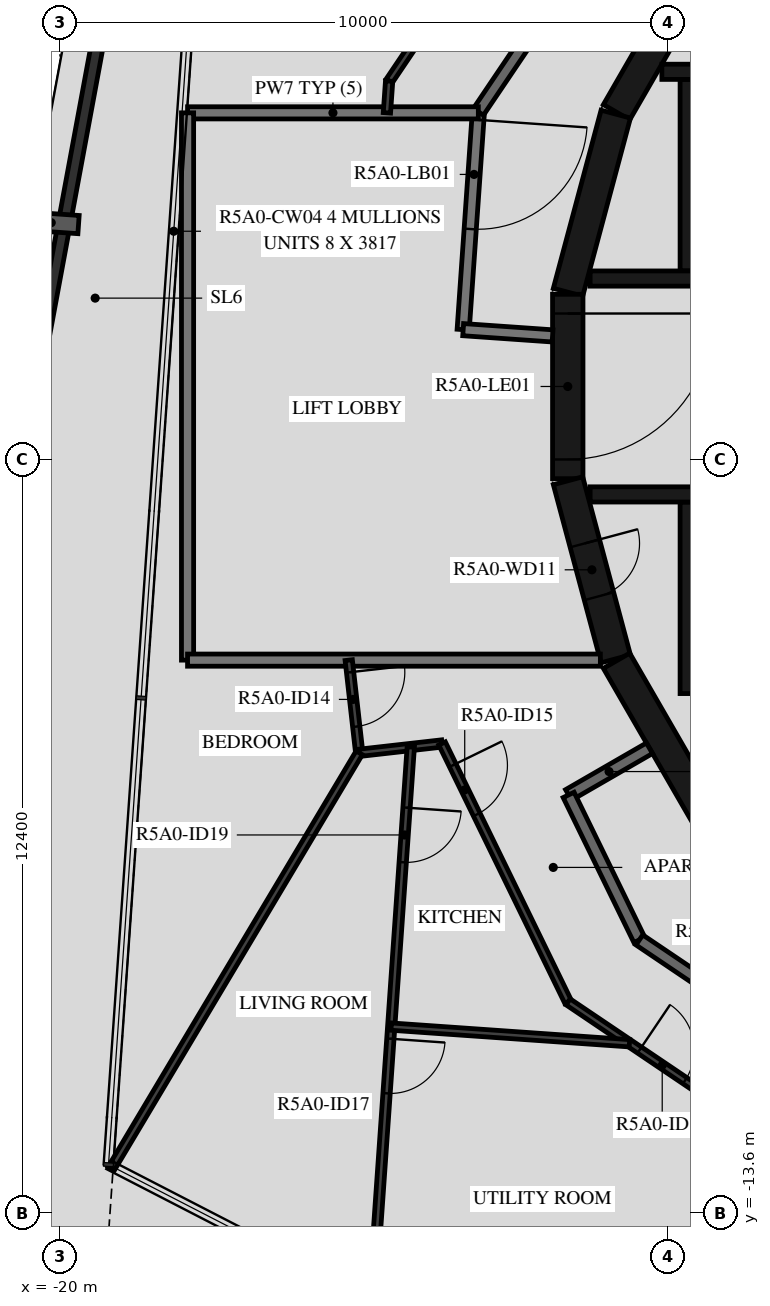
"""IFC4 building model, lengths in metres.
Left out: names, types, materials, properties, quantities, classifications, styles, units other than length and angle.
Written with IfcOpenShell. Run it as: python <this file> out.ifc"""

import sys

from ifc_helpers import new_model, si_unit, direction, frame, frame_2d, origin, origin_2d, place, context, subcontext, project, spatial, polyline, rectangle, i_section, outline, extrude, element, fill, save


model = new_model("IFC4")
c1 = context("Model", 3, precision=1e-05, world=origin(), true_north=direction((0.0, 1.0)))
c2 = subcontext(c1, "Body", "Model", "MODEL_VIEW")
j1 = project(units=[si_unit("LENGTHUNIT", "METRE"), si_unit("PLANEANGLEUNIT", "RADIAN")], contexts=[c1])
p1 = place(None, origin())
s1 = spatial("IfcSite", under=j1, at=p1, CompositionType="ELEMENT")
p2 = place(p1, origin())
s2 = spatial("IfcBuilding", under=s1, at=p2, CompositionType="ELEMENT")
p3 = place(p2, frame((0.0, 0.0, 188.4)))
s3 = spatial("IfcBuildingStorey", under=s2, at=p3, CompositionType="ELEMENT", Elevation=188.4)
p4 = place(p3, frame((-20.142, 2.694, -0.45), z_axis=(0.0, 0.0, 1.0), x_axis=(0.069756005795, 0.997564082982, 0.0)))
e1 = element("IfcColumn", 1, at=p4, inside=s3, PredefinedType="COLUMN", context=c2, shape_type="SweptSolid", body=[
    extrude(i_section(OverallWidth=0.3, OverallDepth=0.9, WebThickness=0.019, FlangeThickness=0.035, FilletRadius=0.03, at=origin_2d()), origin(), (0.0, 0.0, 1.0), 3.57),
])
p5 = place(p3, frame((-23.066, -14.25, 0.03), z_axis=(0.0, 0.0, 1.0), x_axis=(0.182236609877, 0.983254706585, 0.0)))
e2 = element("IfcWall", 2, at=p5, inside=s3, PredefinedType="PARAPET", context=c2, shape_type="SweptSolid", body=[
    extrude(rectangle(XDim=36.429, YDim=0.2, at=frame_2d((18.214, 0.0))), origin(), (0.0, 0.0, 1.0), 1.5),
])
for number, where, z_axis, x_axis in (
    (3, (-9.329, 7.137, 0.0), (0.0, 0.0, 1.0), (-0.5, -0.866, 0.0)),
    (4, (-10.858, 4.479, 0.0), (0.0, 0.0, 1.0), (-0.259, -0.966, 0.0)),
):
    element("IfcWall", number, at=place(p3, frame(where, z_axis=z_axis, x_axis=x_axis)), inside=s3, PredefinedType="SHEAR", context=c2, shape_type="SweptSolid", body=[
        extrude(rectangle(XDim=3.033, YDim=0.5, at=frame_2d((1.516, 0.0))), origin(), (0.0, 0.0, 1.0), 3.12),
    ])
p6 = place(p3, frame((-11.647, 1.516, 0.0), z_axis=(0.0, 0.0, 1.0), x_axis=(0.0, -1.0, 0.0)))
e5 = element("IfcWall", 5, at=p6, inside=s3, PredefinedType="SHEAR", context=c2, shape_type="SweptSolid", body=[
    extrude(rectangle(XDim=3.033, YDim=0.5, at=frame_2d((1.516, 0.0))), origin(), (0.0, 0.0, 1.0), 3.12),
])
p7 = place(p6, frame((0.316, 0.0, 0.0)))
e6 = element("IfcOpeningElement", 6, at=p7, cuts=e5, PredefinedType="OPENING", context=c2, shape_type="SweptSolid", body=[
    extrude(rectangle(XDim=2.4, YDim=2.1, at=frame_2d((1.2, 1.05))), frame((0.0, 0.26, 0.0), z_axis=(0.0, -1.0, 0.0), x_axis=(1.0, 0.0, 0.0)), (0.0, 0.0, 1.0), 0.52),
])
p8 = place(p3, frame((-11.643, -1.55, 0.0), z_axis=(0.0, 0.0, 1.0), x_axis=(0.258734743916, -0.965948410781, 0.0)))
e7 = element("IfcWall", 7, at=p8, inside=s3, PredefinedType="SHEAR", context=c2, shape_type="SweptSolid", body=[
    extrude(rectangle(XDim=3.033, YDim=0.5, at=frame_2d((1.516, 0.0))), origin(), (0.0, 0.0, 1.0), 3.12),
])
p9 = place(p8, frame((1.066, 0.0, 0.0)))
e8 = element("IfcOpeningElement", 8, at=p9, cuts=e7, PredefinedType="OPENING", context=c2, shape_type="SweptSolid", body=[
    extrude(rectangle(XDim=0.9, YDim=2.1, at=frame_2d((0.45, 1.05))), frame((0.0, 0.26, 0.0), z_axis=(0.0, -1.0, 0.0), x_axis=(1.0, 0.0, 0.0)), (0.0, 0.0, 1.0), 0.52),
])
p10 = place(p3, frame((-10.845, -4.51, 0.0), z_axis=(0.0, 0.0, 1.0), x_axis=(0.500087131594, -0.865975092491, 0.0)))
e9 = element("IfcWall", 9, at=p10, inside=s3, PredefinedType="SHEAR", context=c2, shape_type="SweptSolid", body=[
    extrude(rectangle(XDim=3.033, YDim=0.5, at=frame_2d((1.516, 0.0))), origin(), (0.0, 0.0, 1.0), 3.12),
])
p11 = place(p3, frame((-7.0, 5.175, 0.0), z_axis=(0.0, 0.0, 1.0), x_axis=(-1.0, 0.0, 0.0)))
e10 = element("IfcWall", 10, at=p11, inside=s3, PredefinedType="SHEAR", context=c2, shape_type="SweptSolid", body=[
    extrude(rectangle(XDim=3.1, YDim=0.25, at=frame_2d((1.55, 0.0))), origin(), (0.0, 0.0, 1.0), 3.12),
])
p12 = place(p3, origin())
e11 = element("IfcWall", 11, at=p12, inside=s3, PredefinedType="SHEAR", context=c2, shape_type="SweptSolid", body=[
    extrude(outline(polyline([(-9.55, 4.8), (-5.5, 4.8), (-5.5, 1.9), (-5.25, 1.9), (-5.25, 4.8), (-1.2, 4.8), (-1.2, 1.9), (-0.95, 1.9), (-0.95, 4.8), (0.95, 4.8), (0.95, 1.9), (1.2, 1.9), (1.2, 4.8), (3.1, 4.8), (3.1, 1.9), (3.35, 1.9), (3.35, 4.8), (5.25, 4.8), (5.25, 1.9), (5.5, 1.9), (5.5, 4.8), (7.4, 4.8), (7.4, 1.9), (7.65, 1.9), (7.65, 4.8), (9.55, 4.8), (9.55, 1.9), (9.8, 1.9), (9.8, 4.8), (9.8, 5.05), (-9.8, 5.05), (-9.8, 4.8), (-9.8, 1.9), (-9.55, 1.9), (-9.55, 4.8)])), origin(), (0.0, 0.0, 1.0), 3.12),
])
p13 = place(p3, origin())
e12 = element("IfcWall", 12, at=p13, inside=s3, PredefinedType="SHEAR", context=c2, shape_type="SweptSolid", body=[
    extrude(outline(polyline([(9.8, -5.05), (9.8, -4.8), (9.8, -1.9), (9.55, -1.9), (9.55, -4.8), (7.65, -4.8), (7.65, -1.9), (7.4, -1.9), (7.4, -4.8), (5.5, -4.8), (5.5, -1.9), (5.25, -1.9), (5.25, -4.8), (3.35, -4.8), (3.35, -1.9), (3.1, -1.9), (3.1, -4.8), (1.2, -4.8), (1.2, -1.9), (0.95, -1.9), (0.95, -4.8), (-0.95, -4.8), (-0.95, -1.9), (-1.2, -1.9), (-1.2, -4.8), (-3.1, -4.8), (-3.1, -1.9), (-3.35, -1.9), (-3.35, -4.8), (-5.25, -4.8), (-5.25, -1.9), (-5.5, -1.9), (-5.5, -4.8), (-7.4, -4.8), (-7.4, -1.9), (-7.65, -1.9), (-7.65, -4.8), (-9.55, -4.8), (-9.55, -1.9), (-9.8, -1.9), (-9.8, -4.8), (-9.8, -5.05), (9.8, -5.05)])), origin(), (0.0, 0.0, 1.0), 3.12),
])
p14 = place(p3, frame((-11.28, 1.775, 0.0), z_axis=(0.0, 0.0, 1.0), x_axis=(1.0, 0.0, 0.0)))
e13 = element("IfcWall", 13, at=p14, inside=s3, PredefinedType="SHEAR", context=c2, shape_type="SweptSolid", body=[
    extrude(rectangle(XDim=14.38, YDim=0.25, at=frame_2d((7.19, 0.0))), origin(), (0.0, 0.0, 1.0), 3.12),
])
p15 = place(p14, frame((10.73, 0.0, 0.0)))
e14 = element("IfcOpeningElement", 14, at=p15, cuts=e13, PredefinedType="OPENING", context=c2, shape_type="SweptSolid", body=[
    extrude(rectangle(XDim=1.1, YDim=2.1, at=frame_2d((0.55, 1.05))), frame((0.0, 0.135, 0.0), z_axis=(0.0, -1.0, 0.0), x_axis=(1.0, 0.0, 0.0)), (0.0, 0.0, 1.0), 0.27),
])
p16 = place(p14, frame((12.88, 0.0, 0.0)))
e15 = element("IfcOpeningElement", 15, at=p16, cuts=e13, PredefinedType="OPENING", context=c2, shape_type="SweptSolid", body=[
    extrude(rectangle(XDim=1.1, YDim=2.1, at=frame_2d((0.55, 1.05))), frame((0.0, 0.135, 0.0), z_axis=(0.0, -1.0, 0.0), x_axis=(1.0, 0.0, 0.0)), (0.0, 0.0, 1.0), 0.27),
])
p17 = place(p14, frame((3.305, 0.0, 0.0)))
e16 = element("IfcOpeningElement", 16, at=p17, cuts=e13, PredefinedType="OPENING", context=c2, shape_type="SweptSolid", body=[
    extrude(rectangle(XDim=0.9, YDim=2.1, at=frame_2d((0.45, 1.05))), frame((0.0, 0.135, 0.0), z_axis=(0.0, -1.0, 0.0), x_axis=(1.0, 0.0, 0.0)), (0.0, 0.0, 1.0), 0.27),
])
p18 = place(p14, frame((7.605, 0.0, 0.0)))
e17 = element("IfcOpeningElement", 17, at=p18, cuts=e13, PredefinedType="OPENING", context=c2, shape_type="SweptSolid", body=[
    extrude(rectangle(XDim=0.9, YDim=2.1, at=frame_2d((0.45, 1.05))), frame((0.0, 0.135, 0.0), z_axis=(0.0, -1.0, 0.0), x_axis=(1.0, 0.0, 0.0)), (0.0, 0.0, 1.0), 0.27),
])
p19 = place(p3, frame((-11.28, -1.775, 0.0), z_axis=(0.0, 0.0, 1.0), x_axis=(1.0, 0.0, 0.0)))
e18 = element("IfcWall", 18, at=p19, inside=s3, PredefinedType="SHEAR", context=c2, shape_type="SweptSolid", body=[
    extrude(rectangle(XDim=14.38, YDim=0.25, at=frame_2d((7.19, 0.0))), origin(), (0.0, 0.0, 1.0), 3.12),
])
p20 = place(p19, frame((12.88, 0.0, 0.0)))
e19 = element("IfcOpeningElement", 19, at=p20, cuts=e18, PredefinedType="OPENING", context=c2, shape_type="SweptSolid", body=[
    extrude(rectangle(XDim=1.1, YDim=2.1, at=frame_2d((0.55, 1.05))), frame((0.0, 0.135, 0.0), z_axis=(0.0, -1.0, 0.0), x_axis=(1.0, 0.0, 0.0)), (0.0, 0.0, 1.0), 0.27),
])
p21 = place(p19, frame((6.53, 0.0, 0.0)))
e20 = element("IfcOpeningElement", 20, at=p21, cuts=e18, PredefinedType="OPENING", context=c2, shape_type="SweptSolid", body=[
    extrude(rectangle(XDim=0.9, YDim=2.1, at=frame_2d((0.45, 1.05))), frame((0.0, 0.135, 0.0), z_axis=(0.0, -1.0, 0.0), x_axis=(1.0, 0.0, 0.0)), (0.0, 0.0, 1.0), 0.27),
])
p22 = place(p19, frame((8.68, 0.0, 0.0)))
e21 = element("IfcOpeningElement", 21, at=p22, cuts=e18, PredefinedType="OPENING", context=c2, shape_type="SweptSolid", body=[
    extrude(rectangle(XDim=0.9, YDim=2.1, at=frame_2d((0.45, 1.05))), frame((0.0, 0.135, 0.0), z_axis=(0.0, -1.0, 0.0), x_axis=(1.0, 0.0, 0.0)), (0.0, 0.0, 1.0), 0.27),
])
p23 = place(p19, frame((10.83, 0.0, 0.0)))
e22 = element("IfcOpeningElement", 22, at=p23, cuts=e18, PredefinedType="OPENING", context=c2, shape_type="SweptSolid", body=[
    extrude(rectangle(XDim=0.9, YDim=2.1, at=frame_2d((0.45, 1.05))), frame((0.0, 0.135, 0.0), z_axis=(0.0, -1.0, 0.0), x_axis=(1.0, 0.0, 0.0)), (0.0, 0.0, 1.0), 0.27),
])
p24 = place(p3, frame((-13.118, 4.5, 0.0), z_axis=(0.0, 0.0, 1.0), x_axis=(-0.069746872611, -0.99756472159, 0.0)))
e23 = element("IfcWall", 23, at=p24, inside=s3, PredefinedType="STANDARD", context=c2, shape_type="SweptSolid", body=[
    extrude(rectangle(XDim=3.574, YDim=0.2, at=frame_2d((1.787, 0.0))), origin(), (0.0, 0.0, 1.0), 3.12),
])
p25 = place(p24, frame((0.115, 0.0, 0.0)))
e24 = element("IfcOpeningElement", 24, at=p25, cuts=e23, PredefinedType="OPENING", context=c2, shape_type="SweptSolid", body=[
    extrude(rectangle(XDim=1.8, YDim=2.1, at=frame_2d((0.9, 1.05))), frame((0.0, 0.11, 0.0), z_axis=(0.0, -1.0, 0.0), x_axis=(1.0, 0.0, 0.0)), (0.0, 0.0, 1.0), 0.22),
])
p26 = place(p3, frame((-13.367, 0.935, 0.0), z_axis=(0.0, 0.0, 1.0), x_axis=(0.997553656289, -0.069904955655, 0.0)))
e25 = element("IfcWall", 25, at=p26, inside=s3, PredefinedType="STANDARD", context=c2, shape_type="SweptSolid", body=[
    extrude(rectangle(XDim=1.474, YDim=0.2, at=frame_2d((0.737, 0.0))), origin(), (0.0, 0.0, 1.0), 3.12),
])
p27 = place(p3, frame((-9.101, 10.47, 0.0), z_axis=(0.0, 0.0, 1.0), x_axis=(-0.559195469534, -0.829035841718, 0.0)))
e26 = element("IfcWall", 26, at=p27, inside=s3, PredefinedType="STANDARD", context=c2, shape_type="SweptSolid", body=[
    extrude(rectangle(XDim=7.181, YDim=0.2, at=frame_2d((3.591, 0.0))), origin(), (0.0, 0.0, 1.0), 3.12),
])
p28 = place(p27, frame((1.0, 0.0, 0.0)))
e27 = element("IfcOpeningElement", 27, at=p28, cuts=e26, PredefinedType="OPENING", context=c2, shape_type="SweptSolid", body=[
    extrude(rectangle(XDim=1.0, YDim=2.1, at=frame_2d((0.5, 1.05))), frame((0.0, 0.11, 0.0), z_axis=(0.0, -1.0, 0.0), x_axis=(1.0, 0.0, 0.0)), (0.0, 0.0, 1.0), 0.22),
])
p29 = place(p3, frame((-10.303, -5.949, 0.0), z_axis=(0.0, 0.0, 1.0), x_axis=(-0.866042588199, -0.499970234539, 0.0)))
e28 = element("IfcWall", 28, at=p29, inside=s3, PredefinedType="STANDARD", context=c2, shape_type="SweptSolid", body=[
    extrude(rectangle(XDim=1.535, YDim=0.2, at=frame_2d((0.768, 0.0))), origin(), (0.0, 0.0, 1.0), 3.12),
])
p30 = place(p3, frame((-11.633, -6.716, 0.0), z_axis=(0.0, 0.0, 1.0), x_axis=(0.438322116278, -0.898817958422, 0.0)))
e29 = element("IfcWall", 29, at=p30, inside=s3, PredefinedType="STANDARD", context=c2, shape_type="SweptSolid", body=[
    extrude(rectangle(XDim=2.654, YDim=0.2, at=frame_2d((1.327, 0.0))), origin(), (0.0, 0.0, 1.0), 3.12),
])
p31 = place(p3, frame((-10.47, -9.101, 0.0), z_axis=(0.0, 0.0, 1.0), x_axis=(0.829035841718, -0.559195469534, 0.0)))
e30 = element("IfcWall", 30, at=p31, inside=s3, PredefinedType="STANDARD", context=c2, shape_type="SweptSolid", body=[
    extrude(rectangle(XDim=7.181, YDim=0.2, at=frame_2d((3.591, 0.0))), origin(), (0.0, 0.0, 1.0), 3.12),
])
p32 = place(p31, frame((2.39, 0.0, 0.0)))
e31 = element("IfcOpeningElement", 31, at=p32, cuts=e30, PredefinedType="OPENING", context=c2, shape_type="SweptSolid", body=[
    extrude(rectangle(XDim=1.0, YDim=2.1, at=frame_2d((0.5, 1.05))), frame((0.0, 0.11, 0.0), z_axis=(0.0, -1.0, 0.0), x_axis=(1.0, 0.0, 0.0)), (0.0, 0.0, 1.0), 0.22),
])
p33 = place(p3, frame((-13.118, 4.5, 0.0), z_axis=(0.0, 0.0, 1.0), x_axis=(-1.0, 0.0, 0.0)))
e32 = element("IfcWall", 32, at=p33, inside=s3, PredefinedType="STANDARD", context=c2, shape_type="SweptSolid", body=[
    extrude(rectangle(XDim=4.782, YDim=0.2, at=frame_2d((2.391, 0.0))), origin(), (0.0, 0.0, 1.0), 3.12),
])
p34 = place(p3, frame((-17.9, 4.5, 0.0), z_axis=(0.0, 0.0, 1.0), x_axis=(0.0, -1.0, 0.0)))
e33 = element("IfcWall", 33, at=p34, inside=s3, PredefinedType="STANDARD", context=c2, shape_type="SweptSolid", body=[
    extrude(rectangle(XDim=9.0, YDim=0.2, at=frame_2d((4.5, 0.0))), origin(), (0.0, 0.0, 1.0), 3.12),
])
p35 = place(p3, frame((-17.9, -4.5, 0.0), z_axis=(0.0, 0.0, 1.0), x_axis=(1.0, 0.0, 0.0)))
e34 = element("IfcWall", 34, at=p35, inside=s3, PredefinedType="STANDARD", context=c2, shape_type="SweptSolid", body=[
    extrude(rectangle(XDim=6.789, YDim=0.2, at=frame_2d((3.394, 0.0))), origin(), (0.0, 0.0, 1.0), 3.12),
])
p36 = place(p3, frame((-10.407, -15.43, 0.0), z_axis=(0.0, 0.0, 1.0), x_axis=(0.559038328133, 0.829141813973, 0.0)))
e35 = element("IfcWall", 35, at=p36, inside=s3, PredefinedType="STANDARD", context=c2, shape_type="SweptSolid", body=[
    extrude(rectangle(XDim=5.212, YDim=0.2, at=frame_2d((2.606, 0.0))), origin(), (0.0, 0.0, 1.0), 3.12),
])
p37 = place(p3, frame((-10.12, 11.642, 0.0), z_axis=(0.0, 0.0, 1.0), x_axis=(-0.55920080659, -0.829032241779, 0.0)))
e36 = element("IfcWall", 36, at=p37, inside=s3, PredefinedType="PARTITIONING", context=c2, shape_type="SweptSolid", body=[
    extrude(rectangle(XDim=7.985, YDim=0.12, at=frame_2d((3.992, 0.0))), origin(), (0.0, 0.0, 1.0), 3.12),
])
p38 = place(p37, frame((4.346, 0.0, 0.0)))
e37 = element("IfcOpeningElement", 37, at=p38, cuts=e36, PredefinedType="OPENING", context=c2, shape_type="SweptSolid", body=[
    extrude(rectangle(XDim=0.9, YDim=2.1, at=frame_2d((0.45, 1.05))), frame((0.0, 0.07, 0.0), z_axis=(0.0, -1.0, 0.0), x_axis=(1.0, 0.0, 0.0)), (0.0, 0.0, 1.0), 0.14),
])
p39 = place(p3, frame((-14.585, 5.022, 0.0), z_axis=(0.0, 0.0, 1.0), x_axis=(-0.069490327804, -0.997582625321, 0.0)))
e38 = element("IfcWall", 38, at=p39, inside=s3, PredefinedType="PARTITIONING", context=c2, shape_type="SweptSolid", body=[
    extrude(rectangle(XDim=0.523, YDim=0.12, at=frame_2d((0.262, 0.0))), origin(), (0.0, 0.0, 1.0), 3.12),
])
p40 = place(p3, frame((-15.25, -4.5, 0.0), z_axis=(0.0, 0.0, 1.0), x_axis=(0.1124919794, -0.99365263275, 0.0)))
e39 = element("IfcWall", 39, at=p40, inside=s3, PredefinedType="PARTITIONING", context=c2, shape_type="SweptSolid", body=[
    extrude(rectangle(XDim=1.534, YDim=0.12, at=frame_2d((0.767, 0.0))), origin(), (0.0, 0.0, 1.0), 3.12),
])
p41 = place(p40, frame((0.2, 0.0, 0.0)))
e40 = element("IfcOpeningElement", 40, at=p41, cuts=e39, PredefinedType="OPENING", context=c2, shape_type="SweptSolid", body=[
    extrude(rectangle(XDim=0.9, YDim=2.1, at=frame_2d((0.45, 1.05))), frame((0.0, 0.07, 0.0), z_axis=(0.0, -1.0, 0.0), x_axis=(1.0, 0.0, 0.0)), (0.0, 0.0, 1.0), 0.14),
])
p42 = place(p3, frame((-15.077, -6.025, 0.0), z_axis=(0.0, 0.0, 1.0), x_axis=(0.993646958109, 0.112542092746, 0.0)))
e41 = element("IfcWall", 41, at=p42, inside=s3, PredefinedType="PARTITIONING", context=c2, shape_type="SweptSolid", body=[
    extrude(rectangle(XDim=1.371, YDim=0.12, at=frame_2d((0.686, 0.0))), origin(), (0.0, 0.0, 1.0), 3.12),
])
p43 = place(p3, frame((-13.715, -5.87, 0.0), z_axis=(0.0, 0.0, 1.0), x_axis=(0.438372766482, -0.89879325632, 0.0)))
e42 = element("IfcWall", 42, at=p43, inside=s3, PredefinedType="PARTITIONING", context=c2, shape_type="SweptSolid", body=[
    extrude(rectangle(XDim=4.728, YDim=0.12, at=frame_2d((2.364, 0.0))), origin(), (0.0, 0.0, 1.0), 3.12),
])
p44 = place(p43, frame((0.4, 0.0, 0.0)))
e43 = element("IfcOpeningElement", 43, at=p44, cuts=e42, PredefinedType="OPENING", context=c2, shape_type="SweptSolid", body=[
    extrude(rectangle(XDim=0.9, YDim=2.1, at=frame_2d((0.45, 1.05))), frame((0.0, 0.07, 0.0), z_axis=(0.0, -1.0, 0.0), x_axis=(1.0, 0.0, 0.0)), (0.0, 0.0, 1.0), 0.14),
])
p45 = place(p3, frame((-11.642, -10.12, 0.0), z_axis=(0.0, 0.0, 1.0), x_axis=(0.829018066952, -0.559221820629, 0.0)))
e44 = element("IfcWall", 44, at=p45, inside=s3, PredefinedType="PARTITIONING", context=c2, shape_type="SweptSolid", body=[
    extrude(rectangle(XDim=3.992, YDim=0.12, at=frame_2d((1.996, 0.0))), origin(), (0.0, 0.0, 1.0), 3.12),
])
p46 = place(p45, frame((1.417, 0.0, 0.0)))
e45 = element("IfcOpeningElement", 45, at=p46, cuts=e44, PredefinedType="OPENING", context=c2, shape_type="SweptSolid", body=[
    extrude(rectangle(XDim=0.9, YDim=2.1, at=frame_2d((0.45, 1.05))), frame((0.0, 0.07, 0.0), z_axis=(0.0, -1.0, 0.0), x_axis=(1.0, 0.0, 0.0)), (0.0, 0.0, 1.0), 0.14),
])
p47 = place(p3, frame((-19.156, -12.863, 0.0), z_axis=(0.0, 0.0, 1.0), x_axis=(0.512316386407, 0.858796786335, 0.0)))
e46 = element("IfcWall", 46, at=p47, inside=s3, PredefinedType="PARTITIONING", context=c2, shape_type="SweptSolid", body=[
    extrude(rectangle(XDim=7.963, YDim=0.12, at=frame_2d((3.981, 0.0))), origin(), (0.0, 0.0, 1.0), 3.12),
])
p48 = place(p3, frame((-14.229, -5.929, 0.0), z_axis=(0.0, 0.0, 1.0), x_axis=(-0.069740723375, -0.997565151508, 0.0)))
e47 = element("IfcWall", 47, at=p48, inside=s3, PredefinedType="PARTITIONING", context=c2, shape_type="SweptSolid", body=[
    extrude(rectangle(XDim=10.47, YDim=0.12, at=frame_2d((5.235, 0.0))), origin(), (0.0, 0.0, 1.0), 3.12),
])
p49 = place(p48, frame((4.809, 0.0, 0.0)))
e48 = element("IfcOpeningElement", 48, at=p49, cuts=e47, PredefinedType="OPENING", context=c2, shape_type="SweptSolid", body=[
    extrude(rectangle(XDim=0.9, YDim=2.1, at=frame_2d((0.45, 1.05))), frame((0.0, 0.07, 0.0), z_axis=(0.0, -1.0, 0.0), x_axis=(1.0, 0.0, 0.0)), (0.0, 0.0, 1.0), 0.14),
])
p50 = place(p48, frame((1.0, 0.0, 0.0)))
e49 = element("IfcOpeningElement", 49, at=p50, cuts=e47, PredefinedType="OPENING", context=c2, shape_type="SweptSolid", body=[
    extrude(rectangle(XDim=0.9, YDim=2.1, at=frame_2d((0.45, 1.05))), frame((0.0, 0.07, 0.0), z_axis=(0.0, -1.0, 0.0), x_axis=(1.0, 0.0, 0.0)), (0.0, 0.0, 1.0), 0.14),
])
p51 = place(p3, frame((-14.551, -10.527, 0.0), z_axis=(0.0, 0.0, 1.0), x_axis=(0.997564247633, -0.069753651118, 0.0)))
e50 = element("IfcWall", 50, at=p51, inside=s3, PredefinedType="PARTITIONING", context=c2, shape_type="SweptSolid", body=[
    extrude(rectangle(XDim=3.927, YDim=0.12, at=frame_2d((1.963, 0.0))), origin(), (0.0, 0.0, 1.0), 3.12),
])
p52 = place(p7, origin())
e51 = element("IfcDoor", 51, at=p52, inside=s3, OperationType="DOUBLE_DOOR_SINGLE_SWING", PredefinedType="DOOR", context=c2, shape_type="SweptSolid", body=[
    extrude(rectangle(XDim=2.4, YDim=2.1, at=frame_2d((1.2, 1.05))), frame((0.0, 0.025, 0.0), z_axis=(0.0, -1.0, 0.0), x_axis=(1.0, 0.0, 0.0)), (0.0, 0.0, 1.0), 0.05),
])
fill(e6, e51)
p53 = place(p9, origin())
e52 = element("IfcDoor", 52, at=p53, inside=s3, OperationType="SINGLE_SWING_LEFT", PredefinedType="DOOR", context=c2, shape_type="SweptSolid", body=[
    extrude(rectangle(XDim=0.9, YDim=2.1, at=frame_2d((0.45, 1.05))), frame((0.0, 0.025, 0.0), z_axis=(0.0, -1.0, 0.0), x_axis=(1.0, 0.0, 0.0)), (0.0, 0.0, 1.0), 0.05),
])
fill(e8, e52)
p54 = place(p41, origin())
e53 = element("IfcDoor", 53, at=p54, inside=s3, OperationType="SINGLE_SWING_RIGHT", PredefinedType="DOOR", context=c2, shape_type="SweptSolid", body=[
    extrude(rectangle(XDim=0.9, YDim=2.1, at=frame_2d((0.45, 1.05))), frame((0.0, 0.025, 0.0), z_axis=(0.0, -1.0, 0.0), x_axis=(1.0, 0.0, 0.0)), (0.0, 0.0, 1.0), 0.05),
])
fill(e40, e53)
p55 = place(p44, origin())
e54 = element("IfcDoor", 54, at=p55, inside=s3, OperationType="SINGLE_SWING_RIGHT", PredefinedType="DOOR", context=c2, shape_type="SweptSolid", body=[
    extrude(rectangle(XDim=0.9, YDim=2.1, at=frame_2d((0.45, 1.05))), frame((0.0, 0.025, 0.0), z_axis=(0.0, -1.0, 0.0), x_axis=(1.0, 0.0, 0.0)), (0.0, 0.0, 1.0), 0.05),
])
fill(e43, e54)
p56 = place(p46, origin())
e55 = element("IfcDoor", 55, at=p56, inside=s3, OperationType="SINGLE_SWING_RIGHT", PredefinedType="DOOR", context=c2, shape_type="SweptSolid", body=[
    extrude(rectangle(XDim=0.9, YDim=2.1, at=frame_2d((0.45, 1.05))), frame((0.0, 0.025, 0.0), z_axis=(0.0, -1.0, 0.0), x_axis=(1.0, 0.0, 0.0)), (0.0, 0.0, 1.0), 0.05),
])
fill(e45, e55)
p57 = place(p49, origin())
e56 = element("IfcDoor", 56, at=p57, inside=s3, OperationType="SINGLE_SWING_RIGHT", PredefinedType="DOOR", context=c2, shape_type="SweptSolid", body=[
    extrude(rectangle(XDim=0.9, YDim=2.1, at=frame_2d((0.45, 1.05))), frame((0.0, 0.025, 0.0), z_axis=(0.0, -1.0, 0.0), x_axis=(1.0, 0.0, 0.0)), (0.0, 0.0, 1.0), 0.05),
])
fill(e48, e56)
p58 = place(p50, origin())
e57 = element("IfcDoor", 57, at=p58, inside=s3, OperationType="SINGLE_SWING_LEFT", PredefinedType="DOOR", context=c2, shape_type="SweptSolid", body=[
    extrude(rectangle(XDim=0.9, YDim=2.1, at=frame_2d((0.45, 1.05))), frame((0.0, 0.025, 0.0), z_axis=(0.0, -1.0, 0.0), x_axis=(1.0, 0.0, 0.0)), (0.0, 0.0, 1.0), 0.05),
])
fill(e49, e57)
p59 = place(p25, origin())
e58 = element("IfcDoor", 58, at=p59, inside=s3, OperationType="DOUBLE_DOOR_SINGLE_SWING", PredefinedType="DOOR", context=c2, shape_type="SweptSolid", body=[
    extrude(rectangle(XDim=1.8, YDim=2.1, at=frame_2d((0.9, 1.05))), frame((0.0, 0.025, 0.0), z_axis=(0.0, -1.0, 0.0), x_axis=(1.0, 0.0, 0.0)), (0.0, 0.0, 1.0), 0.05),
])
fill(e24, e58)
save(model, sys.argv[1])
